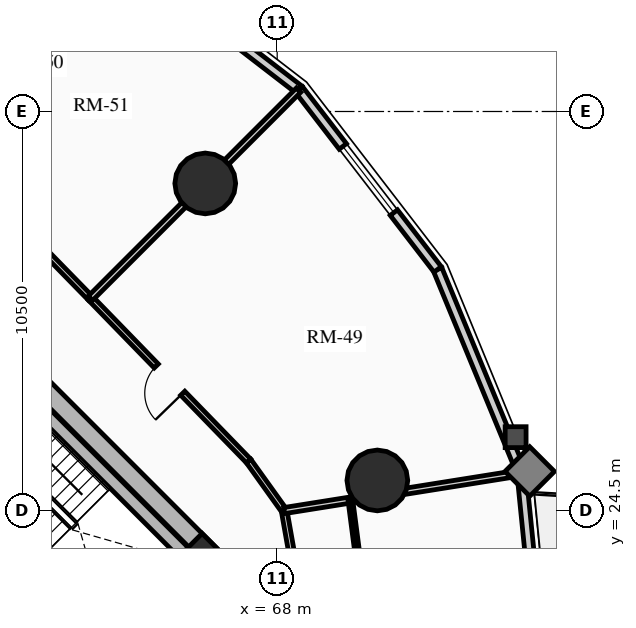
"""IFC4 building model, lengths in metres.
Left out: names, types, materials, properties, quantities, classifications, styles, units other than length and angle.
Written with IfcOpenShell. Run it as: python <this file> out.ifc"""

import sys

from ifc_helpers import new_model, si_unit, direction, frame, frame_2d, origin, origin_2d, place, context, subcontext, project, spatial, rectangle, circle, extrude, source, transform, mapped, element, fill, save


model = new_model("IFC4")
c1 = context("Model", 3, precision=1e-05, world=origin(), true_north=direction((0.0, 1.0)))
c2 = subcontext(c1, "Body", "Model", "MODEL_VIEW")
j1 = project(units=[si_unit("LENGTHUNIT", "METRE"), si_unit("PLANEANGLEUNIT", "RADIAN")], contexts=[c1])
p1 = place(None, origin())
s1 = spatial("IfcSite", under=j1, at=p1, CompositionType="ELEMENT")
p2 = place(p1, origin())
s2 = spatial("IfcBuilding", under=s1, at=p2, CompositionType="ELEMENT")
p3 = place(p2, frame((0.0, 0.0, 48.19)))
s3 = spatial("IfcBuildingStorey", under=s2, at=p3, CompositionType="ELEMENT", Elevation=48.19)
p4 = place(p3, frame((66.339, 23.227, 0.0), z_axis=(0.0, 0.0, 1.0), x_axis=(-0.707106781187, 0.707106781187, 0.0)))
e1 = element("IfcWall", 1, at=p4, inside=s3, PredefinedType="SHEAR", context=c2, shape_type="SweptSolid", body=[
    extrude(rectangle(XDim=14.3, YDim=0.5, at=frame_2d((7.15, 0.0))), origin(), (0.0, 0.0, 1.0), 2.91),
])
p5 = place(p3, frame((58.596, 15.838, 0.0), z_axis=(0.0, 0.0, 1.0), x_axis=(0.707106781187, 0.707106781187, 0.0)))
e2 = element("IfcWall", 2, at=p5, inside=s3, PredefinedType="SHEAR", context=c2, shape_type="SweptSolid", body=[
    extrude(rectangle(XDim=10.7, YDim=0.5, at=frame_2d((5.35, 0.0))), origin(), (0.0, 0.0, 1.0), 2.91),
])
m1 = source(origin(), c2, "Body", "SweptSolid", [
    extrude(rectangle(XDim=1.5, YDim=2.02, at=frame_2d((0.75, 1.01))), frame((0.0, 0.26, 0.0), z_axis=(0.0, -1.0, 0.0), x_axis=(1.0, 0.0, 0.0)), (0.0, 0.0, 1.0), 0.52),
])
p6 = place(p5, frame((5.45, 0.0, 0.0)))
e3 = element("IfcOpeningElement", 3, at=p6, cuts=e2, PredefinedType="OPENING", context=c2, shape_type="MappedRepresentation", body=[
    mapped(m1, transform((0.0, 0.0, 0.0), x_axis=(1.0, 0.0, 0.0), y_axis=(0.0, 1.0, 0.0), z_axis=(0.0, 0.0, 1.0), scale=1.0)),
])
p7 = place(p3, frame((63.662, 20.904, 0.0), z_axis=(0.0, 0.0, 1.0), x_axis=(-0.707106781187, 0.707106781187, 0.0)))
e4 = element("IfcWall", 4, at=p7, inside=s3, PredefinedType="SHEAR", context=c2, shape_type="SweptSolid", body=[
    extrude(rectangle(XDim=13.8, YDim=0.35, at=frame_2d((6.9, 0.0))), origin(), (0.0, 0.0, 1.0), 2.91),
])
m2 = source(origin(), c2, "Body", "SweptSolid", [
    extrude(rectangle(XDim=1.1, YDim=2.015, at=frame_2d((0.55, 1.007))), frame((0.0, 0.185, 0.0), z_axis=(0.0, -1.0, 0.0), x_axis=(1.0, 0.0, 0.0)), (0.0, 0.0, 1.0), 0.37),
])
p8 = place(p7, frame((10.025, 0.0, 0.0)))
e5 = element("IfcOpeningElement", 5, at=p8, cuts=e4, PredefinedType="OPENING", context=c2, shape_type="MappedRepresentation", body=[
    mapped(m2, transform((0.0, 0.0, 0.0), x_axis=(1.0, 0.0, 0.0), y_axis=(0.0, 1.0, 0.0), z_axis=(0.0, 0.0, 1.0), scale=1.0)),
])
p9 = place(p7, frame((12.025, 0.0, 0.0)))
e6 = element("IfcOpeningElement", 6, at=p9, cuts=e4, PredefinedType="OPENING", context=c2, shape_type="MappedRepresentation", body=[
    mapped(m2, transform((0.0, 0.0, 0.0), x_axis=(1.0, 0.0, 0.0), y_axis=(0.0, 1.0, 0.0), z_axis=(0.0, 0.0, 1.0), scale=1.0)),
])
m3 = source(origin(), c2, "Body", "SweptSolid", [
    extrude(rectangle(XDim=1.15, YDim=2.02, at=frame_2d((0.575, 1.01))), frame((0.0, 0.185, 0.0), z_axis=(0.0, -1.0, 0.0), x_axis=(1.0, 0.0, 0.0)), (0.0, 0.0, 1.0), 0.37),
])
p10 = place(p7, frame((5.33, 0.0, 0.0)))
e7 = element("IfcOpeningElement", 7, at=p10, cuts=e4, PredefinedType="OPENING", context=c2, shape_type="MappedRepresentation", body=[
    mapped(m3, transform((0.0, 0.0, 0.0), x_axis=(1.0, 0.0, 0.0), y_axis=(0.0, 1.0, 0.0), z_axis=(0.0, 0.0, 1.0), scale=1.0)),
])
p11 = place(p3, frame((65.847, 23.089, 0.0), z_axis=(0.0, 0.0, 1.0), x_axis=(-0.707106781187, 0.707106781187, 0.0)))
e8 = element("IfcWall", 8, at=p11, inside=s3, PredefinedType="SHEAR", context=c2, shape_type="SweptSolid", body=[
    extrude(rectangle(XDim=6.745, YDim=0.35, at=frame_2d((3.373, 0.0))), origin(), (0.0, 0.0, 1.0), 2.91),
])
p12 = place(p3, frame((66.024, 23.294, 0.0), z_axis=(0.0, 0.0, 1.0), x_axis=(0.707106781187, 0.707106781187, 0.0)))
e9 = element("IfcColumn", 9, at=p12, inside=s3, PredefinedType="COLUMN", context=c2, shape_type="SweptSolid", body=[
    extrude(rectangle(XDim=0.85, YDim=0.85, at=origin_2d()), origin(), (0.0, 0.0, 1.0), 2.91),
])
for number, where, z_axis, x_axis in (
    (10, (66.107, 33.107, 0.0), (0.0, 0.0, 1.0), (1.0, 0.0, 0.0)),
    (11, (70.635, 25.291, 0.0), (0.0, 0.0, 1.0), (1.0, 0.0, 0.0)),
):
    element("IfcColumn", number, at=place(p3, frame(where, z_axis=z_axis, x_axis=x_axis)), inside=s3, PredefinedType="USERDEFINED", context=c2, shape_type="SweptSolid", body=[
        extrude(circle(Radius=0.8, at=origin_2d()), origin(), (0.0, 0.0, 1.0), 2.91),
    ])
p13 = place(p3, frame((63.844, 39.222, 0.0), z_axis=(0.0, 0.0, 1.0), x_axis=(0.792014314407, -0.610502519057, 0.0)))
e12 = element("IfcWall", 12, at=p13, inside=s3, PredefinedType="SOLIDWALL", context=c2, shape_type="SweptSolid", body=[
    extrude(rectangle(XDim=5.973, YDim=0.24, at=frame_2d((2.987, 0.0))), origin(), (0.0, 0.0, 1.0), 2.073),
])
p14 = place(p3, frame((74.428, 25.493, 0.0), z_axis=(0.0, 0.0, 1.0), x_axis=(0.100165739718, -0.994970765694, 0.0)))
e13 = element("IfcWall", 13, at=p14, inside=s3, PredefinedType="SOLIDWALL", context=c2, shape_type="SweptSolid", body=[
    extrude(rectangle(XDim=5.477, YDim=0.24, at=frame_2d((2.738, 0.0))), origin(), (0.0, 0.0, 1.0), 2.073),
])
m4 = source(origin(), c2, "Body", "SweptSolid", [
    extrude(rectangle(XDim=1.15, YDim=2.005, at=frame_2d((0.575, 1.002))), frame((0.0, 0.13, 0.0), z_axis=(0.0, -1.0, 0.0), x_axis=(1.0, 0.0, 0.0)), (0.0, 0.0, 1.0), 0.26),
])
p15 = place(p14, frame((2.163, 0.0, 0.0)))
e14 = element("IfcOpeningElement", 14, at=p15, cuts=e13, PredefinedType="OPENING", context=c2, shape_type="MappedRepresentation", body=[
    mapped(m4, transform((0.0, 0.0, 0.0), x_axis=(1.0, 0.0, 0.0), y_axis=(0.0, 1.0, 0.0), z_axis=(0.0, 0.0, 1.0), scale=1.0)),
])
p16 = place(p3, frame((72.222, 30.844, 0.0), z_axis=(0.0, 0.0, 1.0), x_axis=(0.381027682565, -0.924563629567, 0.0)))
e15 = element("IfcWall", 15, at=p16, inside=s3, PredefinedType="SOLIDWALL", context=c2, shape_type="SweptSolid", body=[
    extrude(rectangle(XDim=5.789, YDim=0.24, at=frame_2d((2.894, 0.0))), origin(), (0.0, 0.0, 1.0), 2.073),
])
p17 = place(p3, frame((68.575, 35.575, 0.0), z_axis=(0.0, 0.0, 1.0), x_axis=(0.610502519057, -0.792014314407, 0.0)))
e16 = element("IfcWall", 16, at=p17, inside=s3, PredefinedType="SOLIDWALL", context=c2, shape_type="SweptSolid", body=[
    extrude(rectangle(XDim=5.973, YDim=0.24, at=frame_2d((2.987, 0.0))), origin(), (0.0, 0.0, 1.0), 2.073),
])
m5 = source(origin(), c2, "Body", "SweptSolid", [
    extrude(rectangle(XDim=2.2, YDim=1.35, at=frame_2d((1.1, 0.675))), frame((0.0, 0.13, 0.0), z_axis=(0.0, -1.0, 0.0), x_axis=(1.0, 0.0, 0.0)), (0.0, 0.0, 1.0), 0.26),
])
p18 = place(p17, frame((1.887, 0.0, 0.65)))
e17 = element("IfcOpeningElement", 17, at=p18, cuts=e16, PredefinedType="OPENING", context=c2, shape_type="MappedRepresentation", body=[
    mapped(m5, transform((0.0, 0.0, 0.0), x_axis=(1.0, 0.0, 0.0), y_axis=(0.0, 1.0, 0.0), z_axis=(0.0, 0.0, 1.0), scale=1.0)),
])
p19 = place(p3, frame((63.086, 30.086, 0.0), z_axis=(0.0, 0.0, 1.0), x_axis=(-0.699032802832, 0.715089603172, 0.0)))
e18 = element("IfcWall", 18, at=p19, inside=s3, PredefinedType="PARTITIONING", context=c2, shape_type="SweptSolid", body=[
    extrude(rectangle(XDim=6.082, YDim=0.15, at=frame_2d((3.041, 0.0))), origin(), (0.0, 0.0, 1.0), 2.159),
])
m6 = source(origin(), c2, "Body", "SweptSolid", [
    extrude(rectangle(XDim=1.05, YDim=2.015, at=frame_2d((0.525, 1.007))), frame((0.0, 0.085, 0.0), z_axis=(0.0, -1.0, 0.0), x_axis=(1.0, 0.0, 0.0)), (0.0, 0.0, 1.0), 0.17),
])
p20 = place(p19, frame((2.516, 0.0, 0.0)))
e19 = element("IfcOpeningElement", 19, at=p20, cuts=e18, PredefinedType="OPENING", context=c2, shape_type="MappedRepresentation", body=[
    mapped(m6, transform((0.0, 0.0, 0.0), x_axis=(1.0, 0.0, 0.0), y_axis=(0.0, 1.0, 0.0), z_axis=(0.0, 0.0, 1.0), scale=1.0)),
])
p21 = place(p3, frame((68.423, 23.142, 0.0), z_axis=(0.0, 0.0, 1.0), x_axis=(-0.174796562349, 0.984604571283, 0.0)))
e20 = element("IfcWall", 20, at=p21, inside=s3, PredefinedType="PARTITIONING", context=c2, shape_type="SweptSolid", body=[
    extrude(rectangle(XDim=1.377, YDim=0.15, at=frame_2d((0.688, 0.0))), origin(), (0.0, 0.0, 1.0), 2.159),
])
p22 = place(p3, frame((68.182, 24.498, 0.0), z_axis=(0.0, 0.0, 1.0), x_axis=(-0.582532339525, 0.812807525437, 0.0)))
e21 = element("IfcWall", 21, at=p22, inside=s3, PredefinedType="PARTITIONING", context=c2, shape_type="SweptSolid", body=[
    extrude(rectangle(XDim=1.605, YDim=0.15, at=frame_2d((0.803, 0.0))), origin(), (0.0, 0.0, 1.0), 2.205),
])
p23 = place(p3, frame((67.247, 25.802, 0.0), z_axis=(0.0, 0.0, 1.0), x_axis=(-0.696771261687, 0.71729339108, 0.0)))
e22 = element("IfcWall", 22, at=p23, inside=s3, PredefinedType="PARTITIONING", context=c2, shape_type="SweptSolid", body=[
    extrude(rectangle(XDim=5.972, YDim=0.15, at=frame_2d((2.986, 0.0))), origin(), (0.0, 0.0, 1.0), 2.635),
])
m7 = source(origin(), c2, "Body", "SweptSolid", [
    extrude(rectangle(XDim=1.0, YDim=2.015, at=frame_2d((0.5, 1.007))), frame((0.0, 0.085, 0.0), z_axis=(0.0, -1.0, 0.0), x_axis=(1.0, 0.0, 0.0)), (0.0, 0.0, 1.0), 0.17),
])
p24 = place(p23, frame((2.486, 0.0, 0.0)))
e23 = element("IfcOpeningElement", 23, at=p24, cuts=e22, PredefinedType="OPENING", context=c2, shape_type="MappedRepresentation", body=[
    mapped(m7, transform((0.0, 0.0, 0.0), x_axis=(1.0, 0.0, 0.0), y_axis=(0.0, 1.0, 0.0), z_axis=(0.0, 0.0, 1.0), scale=1.0)),
])
p25 = place(p3, frame((63.086, 30.086, 0.0), z_axis=(0.0, 0.0, 1.0), x_axis=(0.707106781187, 0.707106781187, 0.0)))
e24 = element("IfcWall", 24, at=p25, inside=s3, PredefinedType="PARTITIONING", context=c2, shape_type="SweptSolid", body=[
    extrude(rectangle(XDim=7.743, YDim=0.16, at=frame_2d((3.872, 0.0))), origin(), (0.0, 0.0, 1.0), 2.073),
])
p26 = place(p3, frame((68.182, 24.498, 0.0), z_axis=(0.0, 0.0, 1.0), x_axis=(0.987550107246, 0.157304754152, 0.0)))
e25 = element("IfcWall", 25, at=p26, inside=s3, PredefinedType="PARTITIONING", context=c2, shape_type="SweptSolid", body=[
    extrude(rectangle(XDim=6.304, YDim=0.16, at=frame_2d((3.152, 0.0))), origin(), (0.0, 0.0, 1.0), 2.073),
])
p27 = place(p3, frame((70.252, 22.275, 0.0), z_axis=(0.0, 0.0, 1.0), x_axis=(-0.129645482902, 0.991560411051, 0.0)))
e26 = element("IfcWall", 26, at=p27, inside=s3, PredefinedType="PARTITIONING", context=c2, shape_type="SweptSolid", body=[
    extrude(rectangle(XDim=2.521, YDim=0.125, at=frame_2d((1.261, 0.0))), origin(), (0.0, 0.0, 1.0), 2.635),
])
m8 = source(origin(), c2, "Body", "SweptSolid", [
    extrude(rectangle(XDim=2.2, YDim=1.35, at=frame_2d((1.1, 0.675))), frame((0.0, 0.03, 0.0), z_axis=(0.0, -1.0, 0.0), x_axis=(1.0, 0.0, 0.0)), (0.0, 0.0, 1.0), 0.06),
])
p28 = place(p18, origin())
e27 = element("IfcWindow", 27, at=p28, inside=s3, PartitioningType="DOUBLE_PANEL_VERTICAL", PredefinedType="WINDOW", context=c2, shape_type="MappedRepresentation", body=[
    mapped(m8, transform((0.0, 0.0, 0.0), x_axis=(1.0, 0.0, 0.0), y_axis=(0.0, 1.0, 0.0), z_axis=(0.0, 0.0, 1.0), scale=1.0)),
])
fill(e17, e27)
m9 = source(origin(), c2, "Body", "SweptSolid", [
    extrude(rectangle(XDim=1.0, YDim=2.015, at=frame_2d((0.5, 1.007))), frame((0.0, 0.025, 0.0), z_axis=(0.0, -1.0, 0.0), x_axis=(1.0, 0.0, 0.0)), (0.0, 0.0, 1.0), 0.05),
])
p29 = place(p24, origin())
e28 = element("IfcDoor", 28, at=p29, inside=s3, OperationType="SINGLE_SWING_LEFT", PredefinedType="DOOR", context=c2, shape_type="MappedRepresentation", body=[
    mapped(m9, transform((0.0, 0.0, 0.0), x_axis=(1.0, 0.0, 0.0), y_axis=(0.0, 1.0, 0.0), z_axis=(0.0, 0.0, 1.0), scale=1.0)),
])
fill(e23, e28)
save(model, sys.argv[1])
